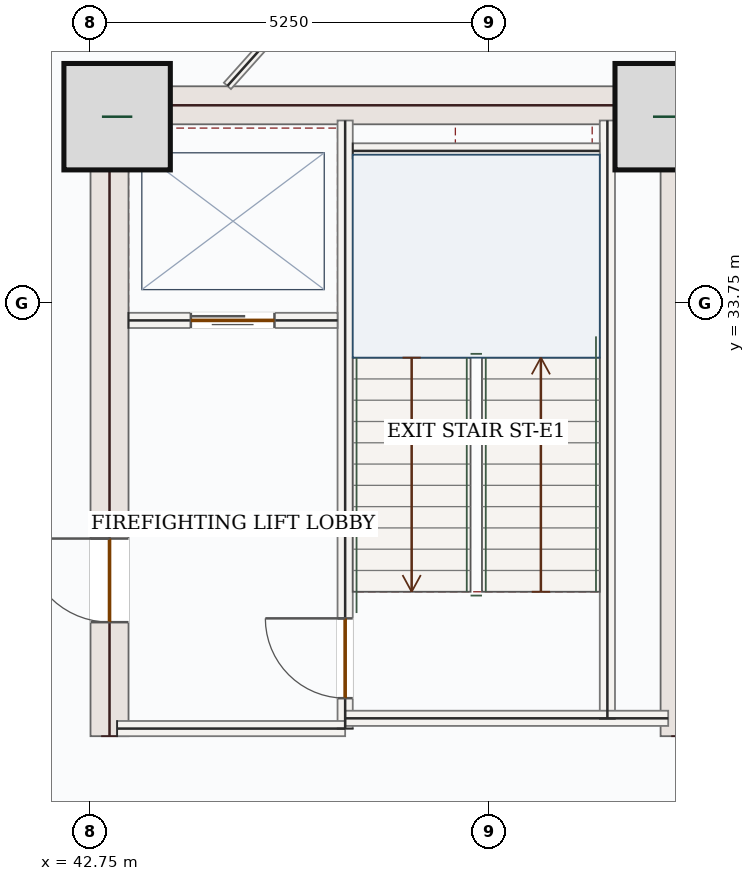
"""IFC4 building model, lengths in metres.
Left out: names, types, materials, properties, quantities, classifications, styles, units other than length and angle.
Written with IfcOpenShell. Run it as: python <this file> out.ifc"""

import sys

from ifc_helpers import new_model, si_unit, direction, frame, frame_2d, origin, origin_2d, place, context, subcontext, project, spatial, rectangle, extrude, source, transform, mapped, element, fill, save


model = new_model("IFC4")
c1 = context("Model", 3, precision=1e-05, world=origin(), true_north=direction((0.0, 1.0)))
c2 = subcontext(c1, "Body", "Model", "MODEL_VIEW")
j1 = project(units=[si_unit("LENGTHUNIT", "METRE"), si_unit("PLANEANGLEUNIT", "RADIAN")], contexts=[c1])
p1 = place(None, origin())
s1 = spatial("IfcSite", under=j1, at=p1, CompositionType="ELEMENT")
p2 = place(p1, origin())
s2 = spatial("IfcBuilding", under=s1, at=p2, CompositionType="ELEMENT")
p3 = place(p2, frame((0.0, 0.0, 71.1)))
s3 = spatial("IfcBuildingStorey", under=s2, at=p3, CompositionType="ELEMENT", Elevation=71.1)
p4 = place(p3, frame((43.0, 28.05, 0.0), z_axis=(0.0, 0.0, 1.0), x_axis=(0.0, 1.0, 0.0)))
e1 = element("IfcWall", 1, at=p4, inside=s3, PredefinedType="SHEAR", context=c2, shape_type="SweptSolid", body=[
    extrude(rectangle(XDim=8.55, YDim=0.5, at=frame_2d((4.275, 0.0))), origin(), (0.0, 0.0, 1.0), 3.95),
])
p5 = place(p4, frame((1.5, 0.0, 0.0)))
e2 = element("IfcOpeningElement", 2, at=p5, cuts=e1, PredefinedType="OPENING", context=c2, shape_type="SweptSolid", body=[
    extrude(rectangle(XDim=1.1, YDim=2.2, at=frame_2d((0.55, 1.1))), frame((0.0, 0.26, 0.0), z_axis=(0.0, -1.0, 0.0), x_axis=(1.0, 0.0, 0.0)), (0.0, 0.0, 1.0), 0.52),
])
m1 = source(origin(), c2, "Body", "SweptSolid", [
    extrude(rectangle(XDim=8.55, YDim=0.5, at=frame_2d((4.275, 0.0))), origin(), (0.0, 0.0, 1.0), 3.95),
])
p6 = place(p3, frame((50.5, 28.05, 0.0), z_axis=(0.0, 0.0, 1.0), x_axis=(0.0, 1.0, 0.0)))
e3 = element("IfcWall", 3, at=p6, inside=s3, PredefinedType="SHEAR", context=c2, shape_type="MappedRepresentation", body=[
    mapped(m1, transform((0.0, 0.0, 0.0), x_axis=(1.0, 0.0, 0.0), y_axis=(0.0, 1.0, 0.0), z_axis=(0.0, 0.0, 1.0), scale=1.0)),
])
m2 = source(origin(), c2, "Body", "SweptSolid", [
    extrude(rectangle(XDim=7.0, YDim=0.5, at=frame_2d((3.5, 0.0))), origin(), (0.0, 0.0, 1.0), 3.95),
])
p7 = place(p3, frame((43.25, 36.35, 0.0), z_axis=(0.0, 0.0, 1.0), x_axis=(1.0, 0.0, 0.0)))
e4 = element("IfcWall", 4, at=p7, inside=s3, PredefinedType="SHEAR", context=c2, shape_type="MappedRepresentation", body=[
    mapped(m2, transform((0.0, 0.0, 0.0), x_axis=(1.0, 0.0, 0.0), y_axis=(0.0, 1.0, 0.0), z_axis=(0.0, 0.0, 1.0), scale=1.0)),
])
m3 = source(origin(), c2, "Body", "SweptSolid", [
    extrude(rectangle(XDim=1.4, YDim=1.4, at=origin_2d()), origin(), (0.0, 0.0, 1.0), 4.2),
])
for number, where, z_axis, x_axis in (
    (5, (43.1, 36.2, 0.0), (0.0, 0.0, 1.0), (1.0, 0.0, 0.0)),
    (6, (50.35, 36.2, 0.0), (0.0, 0.0, 1.0), (1.0, 0.0, 0.0)),
):
    element("IfcColumn", number, at=place(p3, frame(where, z_axis=z_axis, x_axis=x_axis)), inside=s3, PredefinedType="COLUMN", context=c2, shape_type="MappedRepresentation", body=[
        mapped(m3, transform((0.0, 0.0, 0.0), x_axis=(1.0, 0.0, 0.0), y_axis=(0.0, 1.0, 0.0), z_axis=(0.0, 0.0, 1.0), scale=1.0)),
    ])
m4 = source(origin(), c2, "Body", "SweptSolid", [
    extrude(rectangle(XDim=5.258, YDim=0.32, at=frame_2d((2.629, 0.0))), origin(), (0.0, 0.0, 1.0), 3.95),
])
p8 = place(p3, frame((49.342, 39.26, 0.0), z_axis=(0.0, 0.0, 1.0), x_axis=(0.707106781187, -0.707106781187, 0.0)))
e7 = element("IfcWall", 7, at=p8, inside=s3, PredefinedType="SOLIDWALL", context=c2, shape_type="MappedRepresentation", body=[
    mapped(m4, transform((0.0, 0.0, 0.0), x_axis=(1.0, 0.0, 0.0), y_axis=(0.0, 1.0, 0.0), z_axis=(0.0, 0.0, 1.0), scale=1.0)),
])
m5 = source(origin(), c2, "Body", "SweptSolid", [
    extrude(rectangle(XDim=7.87, YDim=0.2, at=frame_2d((3.935, 0.0))), origin(), (0.0, 0.0, 1.0), 3.95),
])
p9 = place(p3, frame((49.55, 28.28, 0.0), z_axis=(0.0, 0.0, 1.0), x_axis=(0.0, 1.0, 0.0)))
e8 = element("IfcWall", 8, at=p9, inside=s3, PredefinedType="SOLIDWALL", context=c2, shape_type="MappedRepresentation", body=[
    mapped(m5, transform((0.0, 0.0, 0.0), x_axis=(1.0, 0.0, 0.0), y_axis=(0.0, 1.0, 0.0), z_axis=(0.0, 0.0, 1.0), scale=1.0)),
])
p10 = place(p3, frame((46.1, 28.15, 0.0), z_axis=(0.0, 0.0, 1.0), x_axis=(0.0, 1.0, 0.0)))
e9 = element("IfcWall", 9, at=p10, inside=s3, PredefinedType="SOLIDWALL", context=c2, shape_type="SweptSolid", body=[
    extrude(rectangle(XDim=8.0, YDim=0.2, at=frame_2d((4.0, 0.0))), origin(), (0.0, 0.0, 1.0), 3.95),
])
p11 = place(p10, frame((0.4, 0.0, 0.0)))
e10 = element("IfcOpeningElement", 10, at=p11, cuts=e9, PredefinedType="OPENING", context=c2, shape_type="SweptSolid", body=[
    extrude(rectangle(XDim=1.05, YDim=2.15, at=frame_2d((0.525, 1.075))), frame((0.0, 0.11, 0.0), z_axis=(0.0, -1.0, 0.0), x_axis=(1.0, 0.0, 0.0)), (0.0, 0.0, 1.0), 0.22),
])
m6 = source(origin(), c2, "Body", "SweptSolid", [
    extrude(rectangle(XDim=3.0, YDim=0.2, at=frame_2d((1.5, 0.0))), origin(), (0.0, 0.0, 1.0), 3.95),
])
p12 = place(p3, frame((43.1, 28.15, 0.0), z_axis=(0.0, 0.0, 1.0), x_axis=(1.0, 0.0, 0.0)))
e11 = element("IfcWall", 11, at=p12, inside=s3, PredefinedType="SOLIDWALL", context=c2, shape_type="MappedRepresentation", body=[
    mapped(m6, transform((0.0, 0.0, 0.0), x_axis=(1.0, 0.0, 0.0), y_axis=(0.0, 1.0, 0.0), z_axis=(0.0, 0.0, 1.0), scale=1.0)),
])
m7 = source(origin(), c2, "Body", "SweptSolid", [
    extrude(rectangle(XDim=4.25, YDim=0.2, at=frame_2d((2.125, 0.0))), origin(), (0.0, 0.0, 1.0), 3.95),
])
p13 = place(p3, frame((46.1, 28.285, 0.0), z_axis=(0.0, 0.0, 1.0), x_axis=(1.0, 0.0, 0.0)))
e12 = element("IfcWall", 12, at=p13, inside=s3, PredefinedType="SOLIDWALL", context=c2, shape_type="MappedRepresentation", body=[
    mapped(m7, transform((0.0, 0.0, 0.0), x_axis=(1.0, 0.0, 0.0), y_axis=(0.0, 1.0, 0.0), z_axis=(0.0, 0.0, 1.0), scale=1.0)),
])
m8 = source(origin(), c2, "Body", "SweptSolid", [
    extrude(rectangle(XDim=3.25, YDim=0.2, at=frame_2d((1.625, 0.0))), origin(), (0.0, 0.0, 1.0), 3.95),
])
p14 = place(p3, frame((46.2, 35.75, 0.0), z_axis=(0.0, 0.0, 1.0), x_axis=(1.0, 0.0, 0.0)))
e13 = element("IfcWall", 13, at=p14, inside=s3, PredefinedType="SOLIDWALL", context=c2, shape_type="MappedRepresentation", body=[
    mapped(m8, transform((0.0, 0.0, 0.0), x_axis=(1.0, 0.0, 0.0), y_axis=(0.0, 1.0, 0.0), z_axis=(0.0, 0.0, 1.0), scale=1.0)),
])
p15 = place(p3, frame((43.25, 33.52, 0.0), z_axis=(0.0, 0.0, 1.0), x_axis=(1.0, 0.0, 0.0)))
e14 = element("IfcWall", 14, at=p15, inside=s3, PredefinedType="SOLIDWALL", context=c2, shape_type="SweptSolid", body=[
    extrude(rectangle(XDim=2.75, YDim=0.2, at=frame_2d((1.375, 0.0))), origin(), (0.0, 0.0, 1.0), 3.95),
])
p16 = place(p15, frame((0.82, 0.0, 0.0)))
e15 = element("IfcOpeningElement", 15, at=p16, cuts=e14, PredefinedType="OPENING", context=c2, shape_type="SweptSolid", body=[
    extrude(rectangle(XDim=1.1, YDim=2.15, at=frame_2d((0.55, 1.075))), frame((0.0, 0.11, 0.0), z_axis=(0.0, -1.0, 0.0), x_axis=(1.0, 0.0, 0.0)), (0.0, 0.0, 1.0), 0.22),
])
m9 = source(origin(), c2, "Body", "SweptSolid", [
    extrude(rectangle(XDim=3.348, YDim=0.125, at=frame_2d((1.674, 0.0))), origin(), (0.0, 0.0, 1.0), 3.95),
])
p17 = place(p3, frame((46.785, 39.099, 0.0), z_axis=(0.0, 0.0, 1.0), x_axis=(-0.667206176518, -0.74487308853, 0.0)))
e16 = element("IfcWall", 16, at=p17, inside=s3, PredefinedType="PARTITIONING", context=c2, shape_type="MappedRepresentation", body=[
    mapped(m9, transform((0.0, 0.0, 0.0), x_axis=(1.0, 0.0, 0.0), y_axis=(0.0, 1.0, 0.0), z_axis=(0.0, 0.0, 1.0), scale=1.0)),
])
m10 = source(origin(), c2, "Body", "SweptSolid", [
    extrude(rectangle(XDim=1.05, YDim=2.15, at=frame_2d((0.525, 1.075))), frame((0.0, 0.025, 0.0), z_axis=(0.0, -1.0, 0.0), x_axis=(1.0, 0.0, 0.0)), (0.0, 0.0, 1.0), 0.05),
])
p18 = place(p11, origin())
e17 = element("IfcDoor", 17, at=p18, inside=s3, OperationType="SINGLE_SWING_RIGHT", PredefinedType="DOOR", context=c2, shape_type="MappedRepresentation", body=[
    mapped(m10, transform((0.0, 0.0, 0.0), x_axis=(1.0, 0.0, 0.0), y_axis=(0.0, 1.0, 0.0), z_axis=(0.0, 0.0, 1.0), scale=1.0)),
])
fill(e10, e17)
m11 = source(origin(), c2, "Body", "SweptSolid", [
    extrude(rectangle(XDim=1.1, YDim=2.15, at=frame_2d((0.55, 1.075))), frame((0.0, 0.025, 0.0), z_axis=(0.0, -1.0, 0.0), x_axis=(1.0, 0.0, 0.0)), (0.0, 0.0, 1.0), 0.05),
])
p19 = place(p16, origin())
e18 = element("IfcDoor", 18, at=p19, inside=s3, OperationType="DOUBLE_DOOR_SLIDING", PredefinedType="DOOR", context=c2, shape_type="MappedRepresentation", body=[
    mapped(m11, transform((0.0, 0.0, 0.0), x_axis=(1.0, 0.0, 0.0), y_axis=(0.0, 1.0, 0.0), z_axis=(0.0, 0.0, 1.0), scale=1.0)),
])
fill(e15, e18)
m12 = source(origin(), c2, "Body", "SweptSolid", [
    extrude(rectangle(XDim=1.1, YDim=2.2, at=frame_2d((0.55, 1.1))), frame((0.0, 0.025, 0.0), z_axis=(0.0, -1.0, 0.0), x_axis=(1.0, 0.0, 0.0)), (0.0, 0.0, 1.0), 0.05),
])
p20 = place(p5, origin())
e19 = element("IfcDoor", 19, at=p20, inside=s3, OperationType="SINGLE_SWING_RIGHT", PredefinedType="DOOR", context=c2, shape_type="MappedRepresentation", body=[
    mapped(m12, transform((0.0, 0.0, 0.0), x_axis=(1.0, 0.0, 0.0), y_axis=(0.0, 1.0, 0.0), z_axis=(0.0, 0.0, 1.0), scale=1.0)),
])
fill(e2, e19)
save(model, sys.argv[1])
